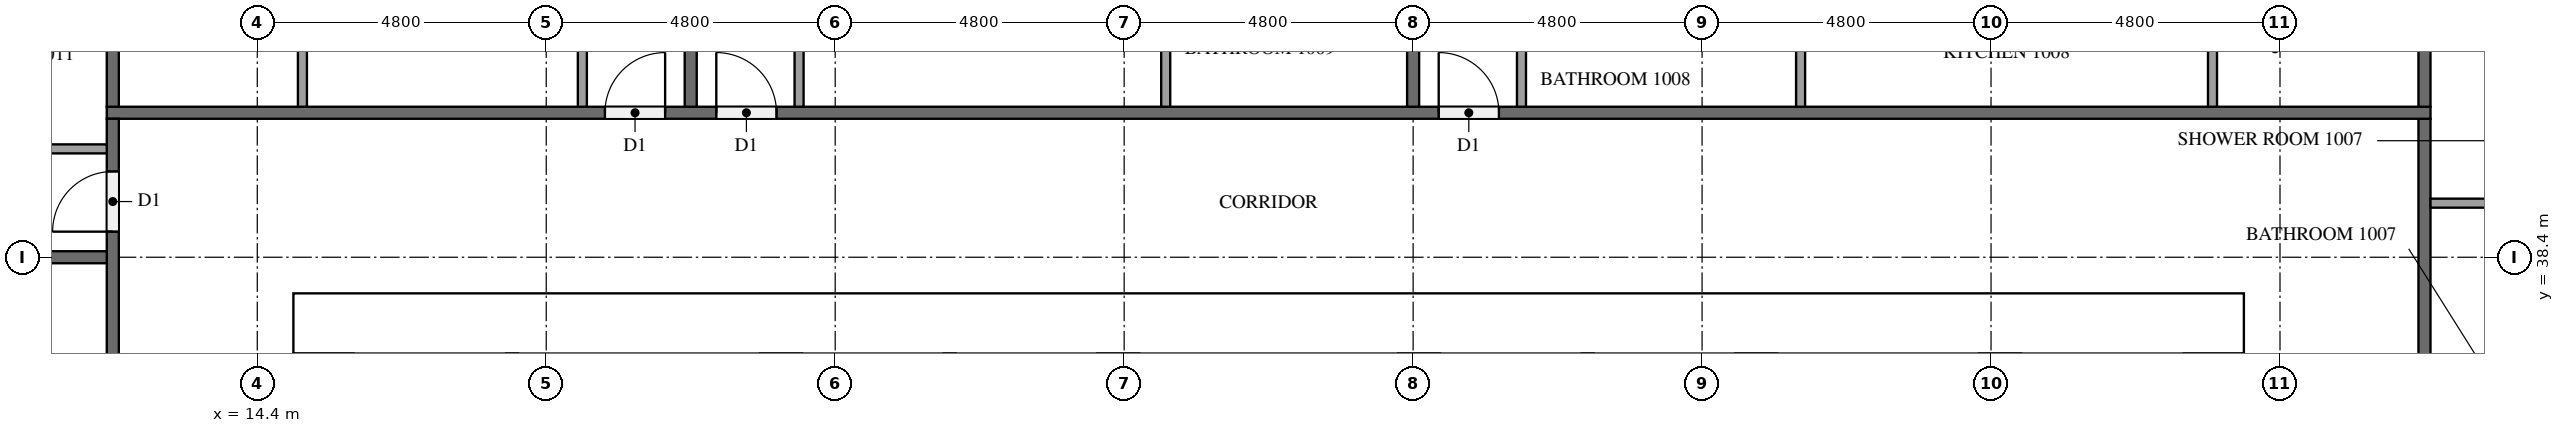
"""IFC4 building model, lengths in metres.
Left out: names, types, materials, properties, quantities, classifications, styles, units other than length and angle.
Written with IfcOpenShell. Run it as: python <this file> out.ifc"""

import sys

from ifc_helpers import new_model, si_unit, direction, frame, frame_2d, origin, place, context, subcontext, project, spatial, rectangle, extrude, element, fill, save


model = new_model("IFC4")
c1 = context("Model", 3, precision=1e-05, world=origin(), true_north=direction((0.0, 1.0)))
c2 = subcontext(c1, "Body", "Model", "MODEL_VIEW")
j1 = project(units=[si_unit("LENGTHUNIT", "METRE"), si_unit("PLANEANGLEUNIT", "RADIAN")], contexts=[c1])
p1 = place(None, origin())
s1 = spatial("IfcSite", under=j1, at=p1, CompositionType="ELEMENT")
p2 = place(p1, origin())
s2 = spatial("IfcBuilding", under=s1, at=p2, CompositionType="ELEMENT")
p3 = place(p2, frame((0.0, 0.0, 43.4)))
s3 = spatial("IfcBuildingStorey", under=s2, at=p3, CompositionType="ELEMENT", Elevation=43.4)
p4 = place(p3, frame((15.0, 37.3, 0.0), z_axis=(0.0, 0.0, 1.0), x_axis=(1.0, 0.0, 0.0)))
e1 = element("IfcWall", 1, at=p4, inside=s3, PredefinedType="SHEAR", context=c2, shape_type="SweptSolid", body=[
    extrude(rectangle(XDim=32.4, YDim=1.0, at=frame_2d((16.2, 0.0))), origin(), (0.0, 0.0, 1.0), 3.2),
])
p5 = place(p4, frame((15.3, 0.0, 0.0)))
e2 = element("IfcOpeningElement", 2, at=p5, cuts=e1, PredefinedType="OPENING", context=c2, shape_type="SweptSolid", body=[
    extrude(rectangle(XDim=1.8, YDim=2.1, at=frame_2d((0.9, 1.05))), frame((0.0, 0.51, 0.0), z_axis=(0.0, -1.0, 0.0), x_axis=(1.0, 0.0, 0.0)), (0.0, 0.0, 1.0), 1.02),
])
p6 = place(p4, frame((1.766, 0.0, 0.0)))
e3 = element("IfcOpeningElement", 3, at=p6, cuts=e1, PredefinedType="OPENING", context=c2, shape_type="SweptSolid", body=[
    extrude(rectangle(XDim=1.0, YDim=2.1, at=frame_2d((0.5, 1.05))), frame((0.0, 0.51, 0.0), z_axis=(0.0, -1.0, 0.0), x_axis=(1.0, 0.0, 0.0)), (0.0, 0.0, 1.0), 1.02),
])
p7 = place(p4, frame((5.241, 0.0, 0.0)))
e4 = element("IfcOpeningElement", 4, at=p7, cuts=e1, PredefinedType="OPENING", context=c2, shape_type="SweptSolid", body=[
    extrude(rectangle(XDim=1.0, YDim=2.1, at=frame_2d((0.5, 1.05))), frame((0.0, 0.51, 0.0), z_axis=(0.0, -1.0, 0.0), x_axis=(1.0, 0.0, 0.0)), (0.0, 0.0, 1.0), 1.02),
])
for number, where, z_axis, x_axis in (
    (5, (28.7, 33.9, 0.0), (0.0, 0.0, 1.0), (0.0, 1.0, 0.0)),
    (6, (33.7, 33.9, 0.0), (0.0, 0.0, 1.0), (0.0, 1.0, 0.0)),
):
    element("IfcWall", number, at=place(p3, frame(where, z_axis=z_axis, x_axis=x_axis)), inside=s3, PredefinedType="SHEAR", context=c2, shape_type="SweptSolid", body=[
        extrude(rectangle(XDim=2.9, YDim=0.7, at=frame_2d((1.45, 0.0))), origin(), (0.0, 0.0, 1.0), 3.2),
    ])
for number, where, z_axis, x_axis in (
    (7, (25.9, 33.9, 0.0), (0.0, 0.0, 1.0), (0.0, 1.0, 0.0)),
    (8, (36.5, 33.9, 0.0), (0.0, 0.0, 1.0), (0.0, 1.0, 0.0)),
):
    element("IfcWall", number, at=place(p3, frame(where, z_axis=z_axis, x_axis=x_axis)), inside=s3, PredefinedType="SOLIDWALL", context=c2, shape_type="SweptSolid", body=[
        extrude(rectangle(XDim=2.9, YDim=0.2, at=frame_2d((1.45, 0.0))), origin(), (0.0, 0.0, 1.0), 3.2),
    ])
p8 = place(p3, frame((18.633, 31.6, 0.0), z_axis=(0.0, 0.0, 1.0), x_axis=(0.0, 1.0, 0.0)))
e9 = element("IfcWall", 9, at=p8, inside=s3, PredefinedType="PARTITIONING", context=c2, shape_type="SweptSolid", body=[
    extrude(rectangle(XDim=5.2, YDim=0.2, at=frame_2d((2.6, 0.0))), origin(), (0.0, 0.0, 1.0), 3.2),
])
p9 = place(p3, frame((50.4, 40.7, 0.0), z_axis=(0.0, 0.0, 1.0), x_axis=(0.0, -1.0, 0.0)))
e10 = element("IfcWall", 10, at=p9, inside=s3, PredefinedType="PARTITIONING", context=c2, shape_type="SweptSolid", body=[
    extrude(rectangle(XDim=28.6, YDim=0.2, at=frame_2d((14.3, 0.0))), origin(), (0.0, 0.0, 1.0), 3.2),
])
p10 = place(p9, frame((17.125, 0.0, 0.0)))
e11 = element("IfcOpeningElement", 11, at=p10, cuts=e10, PredefinedType="OPENING", context=c2, shape_type="SweptSolid", body=[
    extrude(rectangle(XDim=1.0, YDim=2.1, at=frame_2d((0.5, 1.05))), frame((0.0, 0.11, 0.0), z_axis=(0.0, -1.0, 0.0), x_axis=(1.0, 0.0, 0.0)), (0.0, 0.0, 1.0), 0.22),
])
p11 = place(p9, frame((15.275, 0.0, 0.0)))
e12 = element("IfcOpeningElement", 12, at=p11, cuts=e10, PredefinedType="OPENING", context=c2, shape_type="SweptSolid", body=[
    extrude(rectangle(XDim=1.0, YDim=2.1, at=frame_2d((0.5, 1.05))), frame((0.0, 0.11, 0.0), z_axis=(0.0, -1.0, 0.0), x_axis=(1.0, 0.0, 0.0)), (0.0, 0.0, 1.0), 0.22),
])
p12 = place(p9, frame((5.675, 0.0, 0.0)))
e13 = element("IfcOpeningElement", 13, at=p12, cuts=e10, PredefinedType="OPENING", context=c2, shape_type="SweptSolid", body=[
    extrude(rectangle(XDim=1.0, YDim=2.1, at=frame_2d((0.5, 1.05))), frame((0.0, 0.11, 0.0), z_axis=(0.0, -1.0, 0.0), x_axis=(1.0, 0.0, 0.0)), (0.0, 0.0, 1.0), 0.22),
])
p13 = place(p3, frame((11.9, 40.8, 0.0), z_axis=(0.0, 0.0, 1.0), x_axis=(1.0, 0.0, 0.0)))
e14 = element("IfcWall", 14, at=p13, inside=s3, PredefinedType="PARTITIONING", context=c2, shape_type="SweptSolid", body=[
    extrude(rectangle(XDim=38.6, YDim=0.2, at=frame_2d((19.3, 0.0))), origin(), (0.0, 0.0, 1.0), 3.2),
])
p14 = place(p13, frame((22.125, 0.0, 0.0)))
e15 = element("IfcOpeningElement", 15, at=p14, cuts=e14, PredefinedType="OPENING", context=c2, shape_type="SweptSolid", body=[
    extrude(rectangle(XDim=1.0, YDim=2.1, at=frame_2d((0.5, 1.05))), frame((0.0, 0.11, 0.0), z_axis=(0.0, -1.0, 0.0), x_axis=(1.0, 0.0, 0.0)), (0.0, 0.0, 1.0), 0.22),
])
p15 = place(p13, frame((10.125, 0.0, 0.0)))
e16 = element("IfcOpeningElement", 16, at=p15, cuts=e14, PredefinedType="OPENING", context=c2, shape_type="SweptSolid", body=[
    extrude(rectangle(XDim=1.0, YDim=2.1, at=frame_2d((0.5, 1.05))), frame((0.0, 0.11, 0.0), z_axis=(0.0, -1.0, 0.0), x_axis=(1.0, 0.0, 0.0)), (0.0, 0.0, 1.0), 0.22),
])
p16 = place(p13, frame((8.275, 0.0, 0.0)))
e17 = element("IfcOpeningElement", 17, at=p16, cuts=e14, PredefinedType="OPENING", context=c2, shape_type="SweptSolid", body=[
    extrude(rectangle(XDim=1.0, YDim=2.1, at=frame_2d((0.5, 1.05))), frame((0.0, 0.11, 0.0), z_axis=(0.0, -1.0, 0.0), x_axis=(1.0, 0.0, 0.0)), (0.0, 0.0, 1.0), 0.22),
])
p17 = place(p3, frame((12.0, 12.1, 0.0), z_axis=(0.0, 0.0, 1.0), x_axis=(0.0, 1.0, 0.0)))
e18 = element("IfcWall", 18, at=p17, inside=s3, PredefinedType="PARTITIONING", context=c2, shape_type="SweptSolid", body=[
    extrude(rectangle(XDim=28.6, YDim=0.2, at=frame_2d((14.3, 0.0))), origin(), (0.0, 0.0, 1.0), 3.2),
])
p18 = place(p17, frame((26.725, 0.0, 0.0)))
e19 = element("IfcOpeningElement", 19, at=p18, cuts=e18, PredefinedType="OPENING", context=c2, shape_type="SweptSolid", body=[
    extrude(rectangle(XDim=1.0, YDim=2.1, at=frame_2d((0.5, 1.05))), frame((0.0, 0.11, 0.0), z_axis=(0.0, -1.0, 0.0), x_axis=(1.0, 0.0, 0.0)), (0.0, 0.0, 1.0), 0.22),
])
p19 = place(p17, frame((17.125, 0.0, 0.0)))
e20 = element("IfcOpeningElement", 20, at=p19, cuts=e18, PredefinedType="OPENING", context=c2, shape_type="SweptSolid", body=[
    extrude(rectangle(XDim=1.0, YDim=2.1, at=frame_2d((0.5, 1.05))), frame((0.0, 0.11, 0.0), z_axis=(0.0, -1.0, 0.0), x_axis=(1.0, 0.0, 0.0)), (0.0, 0.0, 1.0), 0.22),
])
p20 = place(p17, frame((15.275, 0.0, 0.0)))
e21 = element("IfcOpeningElement", 21, at=p20, cuts=e18, PredefinedType="OPENING", context=c2, shape_type="SweptSolid", body=[
    extrude(rectangle(XDim=1.0, YDim=2.1, at=frame_2d((0.5, 1.05))), frame((0.0, 0.11, 0.0), z_axis=(0.0, -1.0, 0.0), x_axis=(1.0, 0.0, 0.0)), (0.0, 0.0, 1.0), 0.22),
])
p21 = place(p17, frame((5.675, 0.0, 0.0)))
e22 = element("IfcOpeningElement", 22, at=p21, cuts=e18, PredefinedType="OPENING", context=c2, shape_type="SweptSolid", body=[
    extrude(rectangle(XDim=1.0, YDim=2.1, at=frame_2d((0.5, 1.05))), frame((0.0, 0.11, 0.0), z_axis=(0.0, -1.0, 0.0), x_axis=(1.0, 0.0, 0.0)), (0.0, 0.0, 1.0), 0.22),
])
p22 = place(p3, frame((50.4, 40.9, 0.0), z_axis=(0.0, 0.0, 1.0), x_axis=(0.0, 1.0, 0.0)))
e23 = element("IfcWall", 23, at=p22, inside=s3, PredefinedType="PARTITIONING", context=c2, shape_type="SweptSolid", body=[
    extrude(rectangle(XDim=7.0, YDim=0.2, at=frame_2d((3.5, 0.0))), origin(), (0.0, 0.0, 1.0), 3.2),
])
p23 = place(p3, frame((33.6, 47.55, 0.0), z_axis=(0.0, 0.0, 1.0), x_axis=(0.0, -1.0, 0.0)))
e24 = element("IfcWall", 24, at=p23, inside=s3, PredefinedType="PARTITIONING", context=c2, shape_type="SweptSolid", body=[
    extrude(rectangle(XDim=6.65, YDim=0.2, at=frame_2d((3.325, 0.0))), origin(), (0.0, 0.0, 1.0), 3.2),
])
for number, where, z_axis, x_axis in (
    (25, (21.6, 47.9, 0.0), (0.0, 0.0, 1.0), (0.0, -1.0, 0.0)),
    (26, (12.0, 47.9, 0.0), (0.0, 0.0, 1.0), (0.0, -1.0, 0.0)),
):
    element("IfcWall", number, at=place(p3, frame(where, z_axis=z_axis, x_axis=x_axis)), inside=s3, PredefinedType="PARTITIONING", context=c2, shape_type="SweptSolid", body=[
        extrude(rectangle(XDim=7.0, YDim=0.2, at=frame_2d((3.5, 0.0))), origin(), (0.0, 0.0, 1.0), 3.2),
    ])
p24 = place(p3, frame((0.1, 38.4, 0.0), z_axis=(0.0, 0.0, 1.0), x_axis=(1.0, 0.0, 0.0)))
e27 = element("IfcWall", 27, at=p24, inside=s3, PredefinedType="PARTITIONING", context=c2, shape_type="SweptSolid", body=[
    extrude(rectangle(XDim=11.8, YDim=0.2, at=frame_2d((5.9, 0.0))), origin(), (0.0, 0.0, 1.0), 3.2),
])
p25 = place(p3, frame((50.5, 39.298, 0.0), z_axis=(0.0, 0.0, 1.0), x_axis=(1.0, 0.0, 0.0)))
e28 = element("IfcWall", 28, at=p25, inside=s3, PredefinedType="PARTITIONING", context=c2, shape_type="SweptSolid", body=[
    extrude(rectangle(XDim=1.925, YDim=0.15, at=frame_2d((0.962, 0.0))), origin(), (0.0, 0.0, 1.0), 3.2),
])
for number, where, z_axis, x_axis in (
    (29, (40.037, 40.9, 0.0), (0.0, 0.0, 1.0), (0.0, 1.0, 0.0)),
    (30, (46.879, 40.9, 0.0), (0.0, 0.0, 1.0), (0.0, 1.0, 0.0)),
):
    element("IfcWall", number, at=place(p3, frame(where, z_axis=z_axis, x_axis=x_axis)), inside=s3, PredefinedType="PARTITIONING", context=c2, shape_type="SweptSolid", body=[
        extrude(rectangle(XDim=1.775, YDim=0.15, at=frame_2d((0.888, 0.0))), origin(), (0.0, 0.0, 1.0), 3.2),
    ])
p26 = place(p3, frame((35.4, 40.9, 0.0), z_axis=(0.0, 0.0, 1.0), x_axis=(0.0, 1.0, 0.0)))
e31 = element("IfcWall", 31, at=p26, inside=s3, PredefinedType="PARTITIONING", context=c2, shape_type="SweptSolid", body=[
    extrude(rectangle(XDim=1.925, YDim=0.15, at=frame_2d((0.962, 0.0))), origin(), (0.0, 0.0, 1.0), 3.2),
])
p27 = place(p3, frame((29.49, 40.9, 0.0), z_axis=(0.0, 0.0, 1.0), x_axis=(0.0, 1.0, 0.0)))
e32 = element("IfcWall", 32, at=p27, inside=s3, PredefinedType="PARTITIONING", context=c2, shape_type="SweptSolid", body=[
    extrude(rectangle(XDim=2.225, YDim=0.15, at=frame_2d((1.113, 0.0))), origin(), (0.0, 0.0, 1.0), 3.2),
])
p28 = place(p3, frame((23.4, 40.9, 0.0), z_axis=(0.0, 0.0, 1.0), x_axis=(0.0, 1.0, 0.0)))
e33 = element("IfcWall", 33, at=p28, inside=s3, PredefinedType="PARTITIONING", context=c2, shape_type="SweptSolid", body=[
    extrude(rectangle(XDim=2.375, YDim=0.15, at=frame_2d((1.188, 0.0))), origin(), (0.0, 0.0, 1.0), 3.2),
])
p29 = place(p3, frame((15.15, 40.9, 0.0), z_axis=(0.0, 0.0, 1.0), x_axis=(0.0, 1.0, 0.0)))
e34 = element("IfcWall", 34, at=p29, inside=s3, PredefinedType="PARTITIONING", context=c2, shape_type="SweptSolid", body=[
    extrude(rectangle(XDim=2.075, YDim=0.15, at=frame_2d((1.038, 0.0))), origin(), (0.0, 0.0, 1.0), 3.2),
])
p30 = place(p3, frame((19.8, 40.9, 0.0), z_axis=(0.0, 0.0, 1.0), x_axis=(0.0, 1.0, 0.0)))
e35 = element("IfcWall", 35, at=p30, inside=s3, PredefinedType="PARTITIONING", context=c2, shape_type="SweptSolid", body=[
    extrude(rectangle(XDim=2.225, YDim=0.15, at=frame_2d((1.113, 0.0))), origin(), (0.0, 0.0, 1.0), 3.2),
])
p31 = place(p3, frame((11.9, 40.2, 0.0), z_axis=(0.0, 0.0, 1.0), x_axis=(-1.0, 0.0, 0.0)))
e36 = element("IfcWall", 36, at=p31, inside=s3, PredefinedType="PARTITIONING", context=c2, shape_type="SweptSolid", body=[
    extrude(rectangle(XDim=3.425, YDim=0.15, at=frame_2d((1.712, 0.0))), origin(), (0.0, 0.0, 1.0), 3.2),
])
p32 = place(p5, origin())
e37 = element("IfcDoor", 37, at=p32, inside=s3, OperationType="DOUBLE_DOOR_SINGLE_SWING", PredefinedType="DOOR", context=c2, shape_type="SweptSolid", body=[
    extrude(rectangle(XDim=1.8, YDim=2.1, at=frame_2d((0.9, 1.05))), frame((0.0, 0.025, 0.0), z_axis=(0.0, -1.0, 0.0), x_axis=(1.0, 0.0, 0.0)), (0.0, 0.0, 1.0), 0.05),
])
fill(e2, e37)
p33 = place(p6, origin())
e38 = element("IfcDoor", 38, at=p33, inside=s3, OperationType="SINGLE_SWING_LEFT", PredefinedType="DOOR", context=c2, shape_type="SweptSolid", body=[
    extrude(rectangle(XDim=1.0, YDim=2.1, at=frame_2d((0.5, 1.05))), frame((0.0, 0.025, 0.0), z_axis=(0.0, -1.0, 0.0), x_axis=(1.0, 0.0, 0.0)), (0.0, 0.0, 1.0), 0.05),
])
fill(e3, e38)
p34 = place(p7, origin())
e39 = element("IfcDoor", 39, at=p34, inside=s3, OperationType="SINGLE_SWING_RIGHT", PredefinedType="DOOR", context=c2, shape_type="SweptSolid", body=[
    extrude(rectangle(XDim=1.0, YDim=2.1, at=frame_2d((0.5, 1.05))), frame((0.0, 0.025, 0.0), z_axis=(0.0, -1.0, 0.0), x_axis=(1.0, 0.0, 0.0)), (0.0, 0.0, 1.0), 0.05),
])
fill(e4, e39)
p35 = place(p14, origin())
e40 = element("IfcDoor", 40, at=p35, inside=s3, OperationType="SINGLE_SWING_LEFT", PredefinedType="DOOR", context=c2, shape_type="SweptSolid", body=[
    extrude(rectangle(XDim=1.0, YDim=2.1, at=frame_2d((0.5, 1.05))), frame((0.0, 0.025, 0.0), z_axis=(0.0, -1.0, 0.0), x_axis=(1.0, 0.0, 0.0)), (0.0, 0.0, 1.0), 0.05),
])
fill(e15, e40)
p36 = place(p15, origin())
e41 = element("IfcDoor", 41, at=p36, inside=s3, OperationType="SINGLE_SWING_LEFT", PredefinedType="DOOR", context=c2, shape_type="SweptSolid", body=[
    extrude(rectangle(XDim=1.0, YDim=2.1, at=frame_2d((0.5, 1.05))), frame((0.0, 0.025, 0.0), z_axis=(0.0, -1.0, 0.0), x_axis=(1.0, 0.0, 0.0)), (0.0, 0.0, 1.0), 0.05),
])
fill(e16, e41)
p37 = place(p16, origin())
e42 = element("IfcDoor", 42, at=p37, inside=s3, OperationType="SINGLE_SWING_RIGHT", PredefinedType="DOOR", context=c2, shape_type="SweptSolid", body=[
    extrude(rectangle(XDim=1.0, YDim=2.1, at=frame_2d((0.5, 1.05))), frame((0.0, 0.025, 0.0), z_axis=(0.0, -1.0, 0.0), x_axis=(1.0, 0.0, 0.0)), (0.0, 0.0, 1.0), 0.05),
])
fill(e17, e42)
p38 = place(p18, origin())
e43 = element("IfcDoor", 43, at=p38, inside=s3, OperationType="SINGLE_SWING_LEFT", PredefinedType="DOOR", context=c2, shape_type="SweptSolid", body=[
    extrude(rectangle(XDim=1.0, YDim=2.1, at=frame_2d((0.5, 1.05))), frame((0.0, 0.025, 0.0), z_axis=(0.0, -1.0, 0.0), x_axis=(1.0, 0.0, 0.0)), (0.0, 0.0, 1.0), 0.05),
])
fill(e19, e43)
save(model, sys.argv[1])
